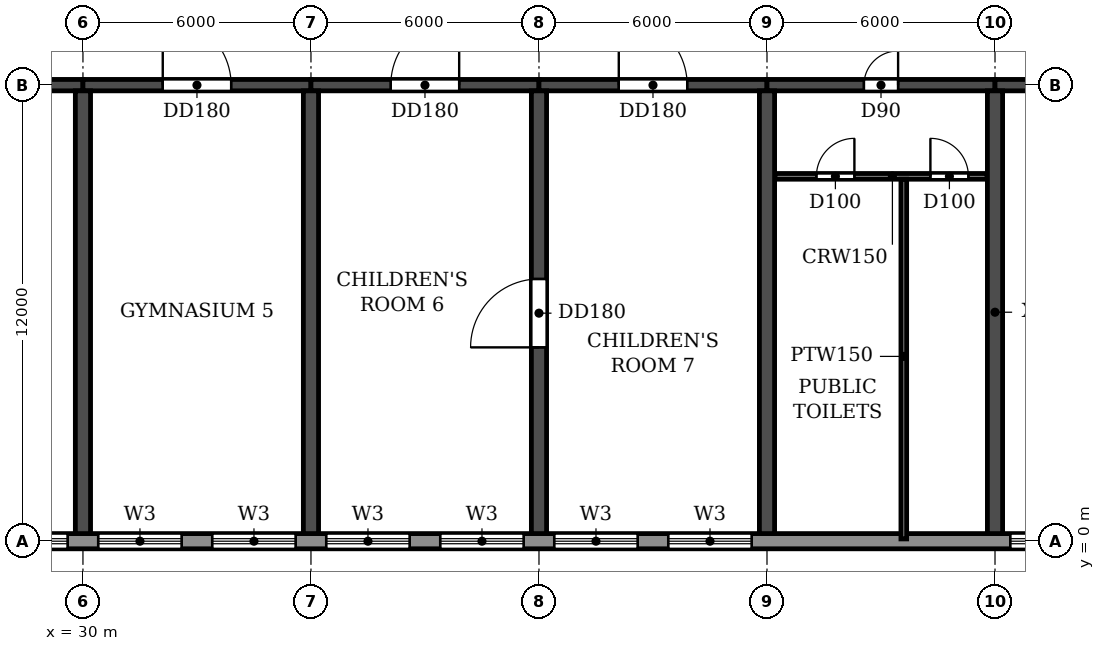
"""IFC4 building model, lengths in metres.
Left out: names, types, materials, properties, quantities, classifications, styles, units other than length and angle.
Written with IfcOpenShell. Run it as: python <this file> out.ifc"""

import sys

from ifc_helpers import new_model, si_unit, direction, frame, frame_2d, origin, place, context, subcontext, project, spatial, rectangle, extrude, element, fill, save


model = new_model("IFC4")
c1 = context("Model", 3, precision=1e-05, world=origin(), true_north=direction((0.0, 1.0)))
c2 = subcontext(c1, "Body", "Model", "MODEL_VIEW")
j1 = project(units=[si_unit("LENGTHUNIT", "METRE"), si_unit("PLANEANGLEUNIT", "RADIAN")], contexts=[c1])
p1 = place(None, origin())
s1 = spatial("IfcSite", under=j1, at=p1, CompositionType="ELEMENT")
p2 = place(p1, origin())
s2 = spatial("IfcBuilding", under=s1, at=p2, CompositionType="ELEMENT")
p3 = place(p2, frame((0.0, 0.0, 53.1)))
s3 = spatial("IfcBuildingStorey", under=s2, at=p3, CompositionType="ELEMENT", Elevation=53.1)
for number, where, z_axis, x_axis in (
    (1, (30.0, 0.2, 0.0), (0.0, 0.0, 1.0), (0.0, 1.0, 0.0)),
    (2, (36.0, 0.2, 0.0), (0.0, 0.0, 1.0), (0.0, 1.0, 0.0)),
):
    element("IfcWall", number, at=place(p3, frame(where, z_axis=z_axis, x_axis=x_axis)), inside=s3, PredefinedType="SHEAR", context=c2, shape_type="SweptSolid", body=[
        extrude(rectangle(XDim=11.65, YDim=0.4, at=frame_2d((5.825, 0.0))), origin(), (0.0, 0.0, 1.0), 3.05),
    ])
p4 = place(p3, frame((42.0, 0.2, 0.0), z_axis=(0.0, 0.0, 1.0), x_axis=(0.0, 1.0, 0.0)))
e3 = element("IfcWall", 3, at=p4, inside=s3, PredefinedType="SHEAR", context=c2, shape_type="SweptSolid", body=[
    extrude(rectangle(XDim=11.65, YDim=0.4, at=frame_2d((5.825, 0.0))), origin(), (0.0, 0.0, 1.0), 3.05),
])
p5 = place(p4, frame((4.9, 0.0, 0.0)))
e4 = element("IfcOpeningElement", 4, at=p5, cuts=e3, PredefinedType="OPENING", context=c2, shape_type="SweptSolid", body=[
    extrude(rectangle(XDim=1.8, YDim=2.1, at=frame_2d((0.9, 1.05))), frame((0.0, 0.21, 0.0), z_axis=(0.0, -1.0, 0.0), x_axis=(1.0, 0.0, 0.0)), (0.0, 0.0, 1.0), 0.42),
])
for number, where, z_axis, x_axis in (
    (5, (48.0, 0.2, 0.0), (0.0, 0.0, 1.0), (0.0, 1.0, 0.0)),
    (6, (54.0, 0.2, 0.0), (0.0, 0.0, 1.0), (0.0, 1.0, 0.0)),
):
    element("IfcWall", number, at=place(p3, frame(where, z_axis=z_axis, x_axis=x_axis)), inside=s3, PredefinedType="SHEAR", context=c2, shape_type="SweptSolid", body=[
        extrude(rectangle(XDim=11.65, YDim=0.4, at=frame_2d((5.825, 0.0))), origin(), (0.0, 0.0, 1.0), 3.05),
    ])
p6 = place(p3, frame((24.0, 12.0, 0.0), z_axis=(0.0, 0.0, 1.0), x_axis=(1.0, 0.0, 0.0)))
e7 = element("IfcWall", 7, at=p6, inside=s3, PredefinedType="SHEAR", context=c2, shape_type="SweptSolid", body=[
    extrude(rectangle(XDim=6.0, YDim=0.3, at=frame_2d((3.0, 0.0))), origin(), (0.0, 0.0, 1.0), 2.45),
])
p7 = place(p6, frame((2.1, 0.0, 0.0)))
e8 = element("IfcOpeningElement", 8, at=p7, cuts=e7, PredefinedType="OPENING", context=c2, shape_type="SweptSolid", body=[
    extrude(rectangle(XDim=1.8, YDim=2.1, at=frame_2d((0.9, 1.05))), frame((0.0, 0.16, 0.0), z_axis=(0.0, -1.0, 0.0), x_axis=(1.0, 0.0, 0.0)), (0.0, 0.0, 1.0), 0.32),
])
p8 = place(p3, frame((30.0, 12.0, 0.0), z_axis=(0.0, 0.0, 1.0), x_axis=(1.0, 0.0, 0.0)))
e9 = element("IfcWall", 9, at=p8, inside=s3, PredefinedType="SHEAR", context=c2, shape_type="SweptSolid", body=[
    extrude(rectangle(XDim=6.0, YDim=0.3, at=frame_2d((3.0, 0.0))), origin(), (0.0, 0.0, 1.0), 2.45),
])
p9 = place(p8, frame((2.1, 0.0, 0.0)))
e10 = element("IfcOpeningElement", 10, at=p9, cuts=e9, PredefinedType="OPENING", context=c2, shape_type="SweptSolid", body=[
    extrude(rectangle(XDim=1.8, YDim=2.1, at=frame_2d((0.9, 1.05))), frame((0.0, 0.16, 0.0), z_axis=(0.0, -1.0, 0.0), x_axis=(1.0, 0.0, 0.0)), (0.0, 0.0, 1.0), 0.32),
])
p10 = place(p3, frame((36.0, 12.0, 0.0), z_axis=(0.0, 0.0, 1.0), x_axis=(1.0, 0.0, 0.0)))
e11 = element("IfcWall", 11, at=p10, inside=s3, PredefinedType="SHEAR", context=c2, shape_type="SweptSolid", body=[
    extrude(rectangle(XDim=6.0, YDim=0.3, at=frame_2d((3.0, 0.0))), origin(), (0.0, 0.0, 1.0), 2.45),
])
p11 = place(p10, frame((2.1, 0.0, 0.0)))
e12 = element("IfcOpeningElement", 12, at=p11, cuts=e11, PredefinedType="OPENING", context=c2, shape_type="SweptSolid", body=[
    extrude(rectangle(XDim=1.8, YDim=2.1, at=frame_2d((0.9, 1.05))), frame((0.0, 0.16, 0.0), z_axis=(0.0, -1.0, 0.0), x_axis=(1.0, 0.0, 0.0)), (0.0, 0.0, 1.0), 0.32),
])
p12 = place(p3, frame((42.0, 12.0, 0.0), z_axis=(0.0, 0.0, 1.0), x_axis=(1.0, 0.0, 0.0)))
e13 = element("IfcWall", 13, at=p12, inside=s3, PredefinedType="SHEAR", context=c2, shape_type="SweptSolid", body=[
    extrude(rectangle(XDim=6.0, YDim=0.3, at=frame_2d((3.0, 0.0))), origin(), (0.0, 0.0, 1.0), 2.45),
])
p13 = place(p12, frame((2.1, 0.0, 0.0)))
e14 = element("IfcOpeningElement", 14, at=p13, cuts=e13, PredefinedType="OPENING", context=c2, shape_type="SweptSolid", body=[
    extrude(rectangle(XDim=1.8, YDim=2.1, at=frame_2d((0.9, 1.05))), frame((0.0, 0.16, 0.0), z_axis=(0.0, -1.0, 0.0), x_axis=(1.0, 0.0, 0.0)), (0.0, 0.0, 1.0), 0.32),
])
p14 = place(p3, frame((48.0, 12.0, 0.0), z_axis=(0.0, 0.0, 1.0), x_axis=(1.0, 0.0, 0.0)))
e15 = element("IfcWall", 15, at=p14, inside=s3, PredefinedType="SHEAR", context=c2, shape_type="SweptSolid", body=[
    extrude(rectangle(XDim=6.0, YDim=0.3, at=frame_2d((3.0, 0.0))), origin(), (0.0, 0.0, 1.0), 2.45),
])
p15 = place(p14, frame((2.55, 0.0, 0.0)))
e16 = element("IfcOpeningElement", 16, at=p15, cuts=e15, PredefinedType="OPENING", context=c2, shape_type="SweptSolid", body=[
    extrude(rectangle(XDim=0.9, YDim=2.1, at=frame_2d((0.45, 1.05))), frame((0.0, 0.16, 0.0), z_axis=(0.0, -1.0, 0.0), x_axis=(1.0, 0.0, 0.0)), (0.0, 0.0, 1.0), 0.32),
])
p16 = place(p3, frame((54.0, 12.0, 0.0), z_axis=(0.0, 0.0, 1.0), x_axis=(1.0, 0.0, 0.0)))
e17 = element("IfcWall", 17, at=p16, inside=s3, PredefinedType="SHEAR", context=c2, shape_type="SweptSolid", body=[
    extrude(rectangle(XDim=6.0, YDim=0.3, at=frame_2d((3.0, 0.0))), origin(), (0.0, 0.0, 1.0), 2.45),
])
p17 = place(p16, frame((2.1, 0.0, 0.0)))
e18 = element("IfcOpeningElement", 18, at=p17, cuts=e17, PredefinedType="OPENING", context=c2, shape_type="SweptSolid", body=[
    extrude(rectangle(XDim=1.8, YDim=2.1, at=frame_2d((0.9, 1.05))), frame((0.0, 0.16, 0.0), z_axis=(0.0, -1.0, 0.0), x_axis=(1.0, 0.0, 0.0)), (0.0, 0.0, 1.0), 0.32),
])
p18 = place(p3, frame((10.683, 0.0, 0.0), z_axis=(0.0, 0.0, 1.0), x_axis=(1.0, 0.0, 0.0)))
e19 = element("IfcWall", 19, at=p18, inside=s3, PredefinedType="STANDARD", context=c2, shape_type="SweptSolid", body=[
    extrude(rectangle(XDim=80.634, YDim=0.4, at=frame_2d((40.317, 0.0))), origin(), (0.0, 0.0, 1.0), 3.05),
])
p19 = place(p18, frame((1.717, 0.0, 0.6)))
e20 = element("IfcOpeningElement", 20, at=p19, cuts=e19, PredefinedType="OPENING", context=c2, shape_type="SweptSolid", body=[
    extrude(rectangle(XDim=2.2, YDim=1.8, at=frame_2d((1.1, 0.9))), frame((0.0, 0.21, 0.0), z_axis=(0.0, -1.0, 0.0), x_axis=(1.0, 0.0, 0.0)), (0.0, 0.0, 1.0), 0.42),
])
p20 = place(p18, frame((4.717, 0.0, 0.6)))
e21 = element("IfcOpeningElement", 21, at=p20, cuts=e19, PredefinedType="OPENING", context=c2, shape_type="SweptSolid", body=[
    extrude(rectangle(XDim=2.2, YDim=1.8, at=frame_2d((1.1, 0.9))), frame((0.0, 0.21, 0.0), z_axis=(0.0, -1.0, 0.0), x_axis=(1.0, 0.0, 0.0)), (0.0, 0.0, 1.0), 0.42),
])
p21 = place(p18, frame((7.717, 0.0, 0.6)))
e22 = element("IfcOpeningElement", 22, at=p21, cuts=e19, PredefinedType="OPENING", context=c2, shape_type="SweptSolid", body=[
    extrude(rectangle(XDim=2.2, YDim=1.8, at=frame_2d((1.1, 0.9))), frame((0.0, 0.21, 0.0), z_axis=(0.0, -1.0, 0.0), x_axis=(1.0, 0.0, 0.0)), (0.0, 0.0, 1.0), 0.42),
])
p22 = place(p18, frame((10.717, 0.0, 0.6)))
e23 = element("IfcOpeningElement", 23, at=p22, cuts=e19, PredefinedType="OPENING", context=c2, shape_type="SweptSolid", body=[
    extrude(rectangle(XDim=2.2, YDim=1.8, at=frame_2d((1.1, 0.9))), frame((0.0, 0.21, 0.0), z_axis=(0.0, -1.0, 0.0), x_axis=(1.0, 0.0, 0.0)), (0.0, 0.0, 1.0), 0.42),
])
p23 = place(p18, frame((13.717, 0.0, 0.6)))
e24 = element("IfcOpeningElement", 24, at=p23, cuts=e19, PredefinedType="OPENING", context=c2, shape_type="SweptSolid", body=[
    extrude(rectangle(XDim=2.2, YDim=1.8, at=frame_2d((1.1, 0.9))), frame((0.0, 0.21, 0.0), z_axis=(0.0, -1.0, 0.0), x_axis=(1.0, 0.0, 0.0)), (0.0, 0.0, 1.0), 0.42),
])
p24 = place(p18, frame((16.717, 0.0, 0.6)))
e25 = element("IfcOpeningElement", 25, at=p24, cuts=e19, PredefinedType="OPENING", context=c2, shape_type="SweptSolid", body=[
    extrude(rectangle(XDim=2.2, YDim=1.8, at=frame_2d((1.1, 0.9))), frame((0.0, 0.21, 0.0), z_axis=(0.0, -1.0, 0.0), x_axis=(1.0, 0.0, 0.0)), (0.0, 0.0, 1.0), 0.42),
])
p25 = place(p18, frame((19.717, 0.0, 0.6)))
e26 = element("IfcOpeningElement", 26, at=p25, cuts=e19, PredefinedType="OPENING", context=c2, shape_type="SweptSolid", body=[
    extrude(rectangle(XDim=2.2, YDim=1.8, at=frame_2d((1.1, 0.9))), frame((0.0, 0.21, 0.0), z_axis=(0.0, -1.0, 0.0), x_axis=(1.0, 0.0, 0.0)), (0.0, 0.0, 1.0), 0.42),
])
p26 = place(p18, frame((22.717, 0.0, 0.6)))
e27 = element("IfcOpeningElement", 27, at=p26, cuts=e19, PredefinedType="OPENING", context=c2, shape_type="SweptSolid", body=[
    extrude(rectangle(XDim=2.2, YDim=1.8, at=frame_2d((1.1, 0.9))), frame((0.0, 0.21, 0.0), z_axis=(0.0, -1.0, 0.0), x_axis=(1.0, 0.0, 0.0)), (0.0, 0.0, 1.0), 0.42),
])
p27 = place(p18, frame((25.717, 0.0, 0.6)))
e28 = element("IfcOpeningElement", 28, at=p27, cuts=e19, PredefinedType="OPENING", context=c2, shape_type="SweptSolid", body=[
    extrude(rectangle(XDim=2.2, YDim=1.8, at=frame_2d((1.1, 0.9))), frame((0.0, 0.21, 0.0), z_axis=(0.0, -1.0, 0.0), x_axis=(1.0, 0.0, 0.0)), (0.0, 0.0, 1.0), 0.42),
])
p28 = place(p18, frame((28.717, 0.0, 0.6)))
e29 = element("IfcOpeningElement", 29, at=p28, cuts=e19, PredefinedType="OPENING", context=c2, shape_type="SweptSolid", body=[
    extrude(rectangle(XDim=2.2, YDim=1.8, at=frame_2d((1.1, 0.9))), frame((0.0, 0.21, 0.0), z_axis=(0.0, -1.0, 0.0), x_axis=(1.0, 0.0, 0.0)), (0.0, 0.0, 1.0), 0.42),
])
p29 = place(p18, frame((31.717, 0.0, 0.6)))
e30 = element("IfcOpeningElement", 30, at=p29, cuts=e19, PredefinedType="OPENING", context=c2, shape_type="SweptSolid", body=[
    extrude(rectangle(XDim=2.2, YDim=1.8, at=frame_2d((1.1, 0.9))), frame((0.0, 0.21, 0.0), z_axis=(0.0, -1.0, 0.0), x_axis=(1.0, 0.0, 0.0)), (0.0, 0.0, 1.0), 0.42),
])
p30 = place(p18, frame((34.717, 0.0, 0.6)))
e31 = element("IfcOpeningElement", 31, at=p30, cuts=e19, PredefinedType="OPENING", context=c2, shape_type="SweptSolid", body=[
    extrude(rectangle(XDim=2.2, YDim=1.8, at=frame_2d((1.1, 0.9))), frame((0.0, 0.21, 0.0), z_axis=(0.0, -1.0, 0.0), x_axis=(1.0, 0.0, 0.0)), (0.0, 0.0, 1.0), 0.42),
])
p31 = place(p18, frame((43.717, 0.0, 0.6)))
e32 = element("IfcOpeningElement", 32, at=p31, cuts=e19, PredefinedType="OPENING", context=c2, shape_type="SweptSolid", body=[
    extrude(rectangle(XDim=2.2, YDim=1.8, at=frame_2d((1.1, 0.9))), frame((0.0, 0.21, 0.0), z_axis=(0.0, -1.0, 0.0), x_axis=(1.0, 0.0, 0.0)), (0.0, 0.0, 1.0), 0.42),
])
p32 = place(p18, frame((46.717, 0.0, 0.6)))
e33 = element("IfcOpeningElement", 33, at=p32, cuts=e19, PredefinedType="OPENING", context=c2, shape_type="SweptSolid", body=[
    extrude(rectangle(XDim=2.2, YDim=1.8, at=frame_2d((1.1, 0.9))), frame((0.0, 0.21, 0.0), z_axis=(0.0, -1.0, 0.0), x_axis=(1.0, 0.0, 0.0)), (0.0, 0.0, 1.0), 0.42),
])
p33 = place(p18, frame((49.717, 0.0, 0.6)))
e34 = element("IfcOpeningElement", 34, at=p33, cuts=e19, PredefinedType="OPENING", context=c2, shape_type="SweptSolid", body=[
    extrude(rectangle(XDim=2.2, YDim=1.8, at=frame_2d((1.1, 0.9))), frame((0.0, 0.21, 0.0), z_axis=(0.0, -1.0, 0.0), x_axis=(1.0, 0.0, 0.0)), (0.0, 0.0, 1.0), 0.42),
])
p34 = place(p18, frame((52.717, 0.0, 0.6)))
e35 = element("IfcOpeningElement", 35, at=p34, cuts=e19, PredefinedType="OPENING", context=c2, shape_type="SweptSolid", body=[
    extrude(rectangle(XDim=2.2, YDim=1.8, at=frame_2d((1.1, 0.9))), frame((0.0, 0.21, 0.0), z_axis=(0.0, -1.0, 0.0), x_axis=(1.0, 0.0, 0.0)), (0.0, 0.0, 1.0), 0.42),
])
p35 = place(p18, frame((61.717, 0.0, 0.6)))
e36 = element("IfcOpeningElement", 36, at=p35, cuts=e19, PredefinedType="OPENING", context=c2, shape_type="SweptSolid", body=[
    extrude(rectangle(XDim=2.2, YDim=1.8, at=frame_2d((1.1, 0.9))), frame((0.0, 0.21, 0.0), z_axis=(0.0, -1.0, 0.0), x_axis=(1.0, 0.0, 0.0)), (0.0, 0.0, 1.0), 0.42),
])
p36 = place(p18, frame((64.717, 0.0, 0.6)))
e37 = element("IfcOpeningElement", 37, at=p36, cuts=e19, PredefinedType="OPENING", context=c2, shape_type="SweptSolid", body=[
    extrude(rectangle(XDim=2.2, YDim=1.8, at=frame_2d((1.1, 0.9))), frame((0.0, 0.21, 0.0), z_axis=(0.0, -1.0, 0.0), x_axis=(1.0, 0.0, 0.0)), (0.0, 0.0, 1.0), 0.42),
])
p37 = place(p18, frame((67.717, 0.0, 0.6)))
e38 = element("IfcOpeningElement", 38, at=p37, cuts=e19, PredefinedType="OPENING", context=c2, shape_type="SweptSolid", body=[
    extrude(rectangle(XDim=2.2, YDim=1.8, at=frame_2d((1.1, 0.9))), frame((0.0, 0.21, 0.0), z_axis=(0.0, -1.0, 0.0), x_axis=(1.0, 0.0, 0.0)), (0.0, 0.0, 1.0), 0.42),
])
p38 = place(p18, frame((70.717, 0.0, 0.6)))
e39 = element("IfcOpeningElement", 39, at=p38, cuts=e19, PredefinedType="OPENING", context=c2, shape_type="SweptSolid", body=[
    extrude(rectangle(XDim=2.2, YDim=1.8, at=frame_2d((1.1, 0.9))), frame((0.0, 0.21, 0.0), z_axis=(0.0, -1.0, 0.0), x_axis=(1.0, 0.0, 0.0)), (0.0, 0.0, 1.0), 0.42),
])
p39 = place(p18, frame((73.717, 0.0, 0.6)))
e40 = element("IfcOpeningElement", 40, at=p39, cuts=e19, PredefinedType="OPENING", context=c2, shape_type="SweptSolid", body=[
    extrude(rectangle(XDim=2.2, YDim=1.8, at=frame_2d((1.1, 0.9))), frame((0.0, 0.21, 0.0), z_axis=(0.0, -1.0, 0.0), x_axis=(1.0, 0.0, 0.0)), (0.0, 0.0, 1.0), 0.42),
])
p40 = place(p18, frame((76.717, 0.0, 0.6)))
e41 = element("IfcOpeningElement", 41, at=p40, cuts=e19, PredefinedType="OPENING", context=c2, shape_type="SweptSolid", body=[
    extrude(rectangle(XDim=2.2, YDim=1.8, at=frame_2d((1.1, 0.9))), frame((0.0, 0.21, 0.0), z_axis=(0.0, -1.0, 0.0), x_axis=(1.0, 0.0, 0.0)), (0.0, 0.0, 1.0), 0.42),
])
p41 = place(p3, frame((48.21, 9.6, 0.0), z_axis=(0.0, 0.0, 1.0), x_axis=(1.0, 0.0, 0.0)))
e42 = element("IfcWall", 42, at=p41, inside=s3, PredefinedType="PARTITIONING", context=c2, shape_type="SweptSolid", body=[
    extrude(rectangle(XDim=5.58, YDim=0.15, at=frame_2d((2.79, 0.0))), origin(), (0.0, 0.0, 1.0), 3.05),
])
p42 = place(p41, frame((1.09, 0.0, 0.0)))
e43 = element("IfcOpeningElement", 43, at=p42, cuts=e42, PredefinedType="OPENING", context=c2, shape_type="SweptSolid", body=[
    extrude(rectangle(XDim=1.0, YDim=2.1, at=frame_2d((0.5, 1.05))), frame((0.0, 0.085, 0.0), z_axis=(0.0, -1.0, 0.0), x_axis=(1.0, 0.0, 0.0)), (0.0, 0.0, 1.0), 0.17),
])
p43 = place(p41, frame((4.09, 0.0, 0.0)))
e44 = element("IfcOpeningElement", 44, at=p43, cuts=e42, PredefinedType="OPENING", context=c2, shape_type="SweptSolid", body=[
    extrude(rectangle(XDim=1.0, YDim=2.1, at=frame_2d((0.5, 1.05))), frame((0.0, 0.085, 0.0), z_axis=(0.0, -1.0, 0.0), x_axis=(1.0, 0.0, 0.0)), (0.0, 0.0, 1.0), 0.17),
])
p44 = place(p3, frame((51.6, 0.06, 0.0), z_axis=(0.0, 0.0, 1.0), x_axis=(0.0, 1.0, 0.0)))
e45 = element("IfcWall", 45, at=p44, inside=s3, PredefinedType="PARTITIONING", context=c2, shape_type="SweptSolid", body=[
    extrude(rectangle(XDim=9.465, YDim=0.15, at=frame_2d((4.732, 0.0))), origin(), (0.0, 0.0, 1.0), 3.05),
])
p45 = place(p24, origin())
e46 = element("IfcWindow", 46, at=p45, inside=s3, PartitioningType="DOUBLE_PANEL_HORIZONTAL", PredefinedType="WINDOW", context=c2, shape_type="SweptSolid", body=[
    extrude(rectangle(XDim=2.2, YDim=1.8, at=frame_2d((1.1, 0.9))), frame((0.0, 0.03, 0.0), z_axis=(0.0, -1.0, 0.0), x_axis=(1.0, 0.0, 0.0)), (0.0, 0.0, 1.0), 0.06),
])
fill(e25, e46)
p46 = place(p25, origin())
e47 = element("IfcWindow", 47, at=p46, inside=s3, PartitioningType="DOUBLE_PANEL_HORIZONTAL", PredefinedType="WINDOW", context=c2, shape_type="SweptSolid", body=[
    extrude(rectangle(XDim=2.2, YDim=1.8, at=frame_2d((1.1, 0.9))), frame((0.0, 0.03, 0.0), z_axis=(0.0, -1.0, 0.0), x_axis=(1.0, 0.0, 0.0)), (0.0, 0.0, 1.0), 0.06),
])
fill(e26, e47)
p47 = place(p26, origin())
e48 = element("IfcWindow", 48, at=p47, inside=s3, PartitioningType="DOUBLE_PANEL_HORIZONTAL", PredefinedType="WINDOW", context=c2, shape_type="SweptSolid", body=[
    extrude(rectangle(XDim=2.2, YDim=1.8, at=frame_2d((1.1, 0.9))), frame((0.0, 0.03, 0.0), z_axis=(0.0, -1.0, 0.0), x_axis=(1.0, 0.0, 0.0)), (0.0, 0.0, 1.0), 0.06),
])
fill(e27, e48)
p48 = place(p27, origin())
e49 = element("IfcWindow", 49, at=p48, inside=s3, PartitioningType="DOUBLE_PANEL_HORIZONTAL", PredefinedType="WINDOW", context=c2, shape_type="SweptSolid", body=[
    extrude(rectangle(XDim=2.2, YDim=1.8, at=frame_2d((1.1, 0.9))), frame((0.0, 0.03, 0.0), z_axis=(0.0, -1.0, 0.0), x_axis=(1.0, 0.0, 0.0)), (0.0, 0.0, 1.0), 0.06),
])
fill(e28, e49)
p49 = place(p28, origin())
e50 = element("IfcWindow", 50, at=p49, inside=s3, PartitioningType="DOUBLE_PANEL_HORIZONTAL", PredefinedType="WINDOW", context=c2, shape_type="SweptSolid", body=[
    extrude(rectangle(XDim=2.2, YDim=1.8, at=frame_2d((1.1, 0.9))), frame((0.0, 0.03, 0.0), z_axis=(0.0, -1.0, 0.0), x_axis=(1.0, 0.0, 0.0)), (0.0, 0.0, 1.0), 0.06),
])
fill(e29, e50)
p50 = place(p29, origin())
e51 = element("IfcWindow", 51, at=p50, inside=s3, PartitioningType="DOUBLE_PANEL_HORIZONTAL", PredefinedType="WINDOW", context=c2, shape_type="SweptSolid", body=[
    extrude(rectangle(XDim=2.2, YDim=1.8, at=frame_2d((1.1, 0.9))), frame((0.0, 0.03, 0.0), z_axis=(0.0, -1.0, 0.0), x_axis=(1.0, 0.0, 0.0)), (0.0, 0.0, 1.0), 0.06),
])
fill(e30, e51)
p51 = place(p30, origin())
e52 = element("IfcWindow", 52, at=p51, inside=s3, PartitioningType="DOUBLE_PANEL_HORIZONTAL", PredefinedType="WINDOW", context=c2, shape_type="SweptSolid", body=[
    extrude(rectangle(XDim=2.2, YDim=1.8, at=frame_2d((1.1, 0.9))), frame((0.0, 0.03, 0.0), z_axis=(0.0, -1.0, 0.0), x_axis=(1.0, 0.0, 0.0)), (0.0, 0.0, 1.0), 0.06),
])
fill(e31, e52)
p52 = place(p31, origin())
e53 = element("IfcWindow", 53, at=p52, inside=s3, PartitioningType="DOUBLE_PANEL_HORIZONTAL", PredefinedType="WINDOW", context=c2, shape_type="SweptSolid", body=[
    extrude(rectangle(XDim=2.2, YDim=1.8, at=frame_2d((1.1, 0.9))), frame((0.0, 0.03, 0.0), z_axis=(0.0, -1.0, 0.0), x_axis=(1.0, 0.0, 0.0)), (0.0, 0.0, 1.0), 0.06),
])
fill(e32, e53)
p53 = place(p9, origin())
e54 = element("IfcDoor", 54, at=p53, inside=s3, OperationType="DOUBLE_DOOR_SINGLE_SWING", PredefinedType="DOOR", context=c2, shape_type="SweptSolid", body=[
    extrude(rectangle(XDim=1.8, YDim=2.1, at=frame_2d((0.9, 1.05))), frame((0.0, 0.025, 0.0), z_axis=(0.0, -1.0, 0.0), x_axis=(1.0, 0.0, 0.0)), (0.0, 0.0, 1.0), 0.05),
])
fill(e10, e54)
p54 = place(p11, origin())
e55 = element("IfcDoor", 55, at=p54, inside=s3, OperationType="DOUBLE_DOOR_SINGLE_SWING", PredefinedType="DOOR", context=c2, shape_type="SweptSolid", body=[
    extrude(rectangle(XDim=1.8, YDim=2.1, at=frame_2d((0.9, 1.05))), frame((0.0, 0.025, 0.0), z_axis=(0.0, -1.0, 0.0), x_axis=(1.0, 0.0, 0.0)), (0.0, 0.0, 1.0), 0.05),
])
fill(e12, e55)
p55 = place(p13, origin())
e56 = element("IfcDoor", 56, at=p55, inside=s3, OperationType="DOUBLE_DOOR_SINGLE_SWING", PredefinedType="DOOR", context=c2, shape_type="SweptSolid", body=[
    extrude(rectangle(XDim=1.8, YDim=2.1, at=frame_2d((0.9, 1.05))), frame((0.0, 0.025, 0.0), z_axis=(0.0, -1.0, 0.0), x_axis=(1.0, 0.0, 0.0)), (0.0, 0.0, 1.0), 0.05),
])
fill(e14, e56)
p56 = place(p15, origin())
e57 = element("IfcDoor", 57, at=p56, inside=s3, OperationType="SINGLE_SWING_RIGHT", PredefinedType="DOOR", context=c2, shape_type="SweptSolid", body=[
    extrude(rectangle(XDim=0.9, YDim=2.1, at=frame_2d((0.45, 1.05))), frame((0.0, 0.025, 0.0), z_axis=(0.0, -1.0, 0.0), x_axis=(1.0, 0.0, 0.0)), (0.0, 0.0, 1.0), 0.05),
])
fill(e16, e57)
p57 = place(p5, origin())
e58 = element("IfcDoor", 58, at=p57, inside=s3, OperationType="DOUBLE_DOOR_SINGLE_SWING", PredefinedType="DOOR", context=c2, shape_type="SweptSolid", body=[
    extrude(rectangle(XDim=1.8, YDim=2.1, at=frame_2d((0.9, 1.05))), frame((0.0, 0.025, 0.0), z_axis=(0.0, -1.0, 0.0), x_axis=(1.0, 0.0, 0.0)), (0.0, 0.0, 1.0), 0.05),
])
fill(e4, e58)
p58 = place(p42, origin())
e59 = element("IfcDoor", 59, at=p58, inside=s3, OperationType="SINGLE_SWING_RIGHT", PredefinedType="DOOR", context=c2, shape_type="SweptSolid", body=[
    extrude(rectangle(XDim=1.0, YDim=2.1, at=frame_2d((0.5, 1.05))), frame((0.0, 0.025, 0.0), z_axis=(0.0, -1.0, 0.0), x_axis=(1.0, 0.0, 0.0)), (0.0, 0.0, 1.0), 0.05),
])
fill(e43, e59)
p59 = place(p43, origin())
e60 = element("IfcDoor", 60, at=p59, inside=s3, OperationType="SINGLE_SWING_LEFT", PredefinedType="DOOR", context=c2, shape_type="SweptSolid", body=[
    extrude(rectangle(XDim=1.0, YDim=2.1, at=frame_2d((0.5, 1.05))), frame((0.0, 0.025, 0.0), z_axis=(0.0, -1.0, 0.0), x_axis=(1.0, 0.0, 0.0)), (0.0, 0.0, 1.0), 0.05),
])
fill(e44, e60)
save(model, sys.argv[1])
